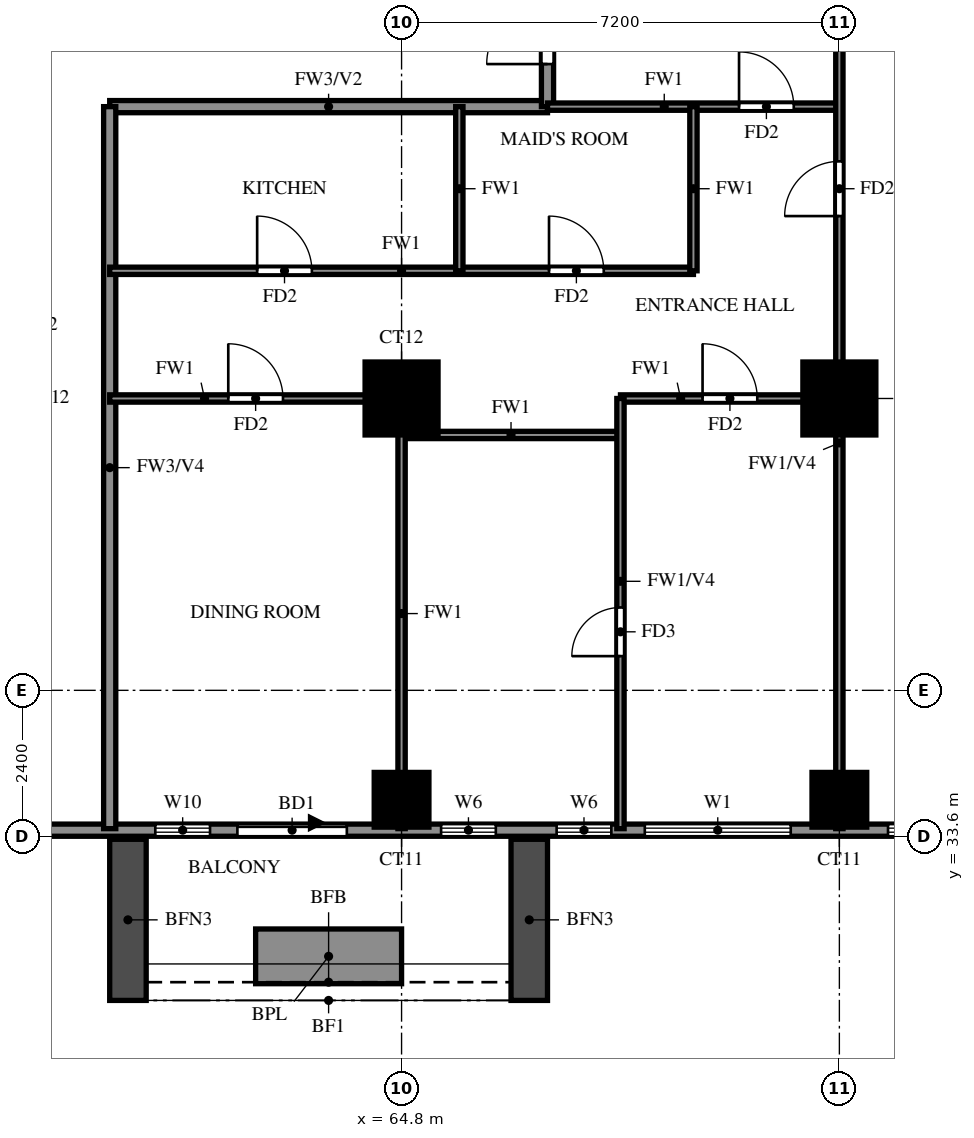
"""IFC4 building model, lengths in metres.
Left out: names, types, materials, properties, quantities, classifications, styles, units other than length and angle.
Written with IfcOpenShell. Run it as: python <this file> out.ifc"""

import sys

from ifc_helpers import new_model, si_unit, direction, frame, frame_2d, origin, origin_2d, place, context, subcontext, project, spatial, rectangle, extrude, source, transform, mapped, element, fill, save


model = new_model("IFC4")
c1 = context("Model", 3, precision=1e-05, world=origin(), true_north=direction((0.0, 1.0)))
c2 = subcontext(c1, "Body", "Model", "MODEL_VIEW")
j1 = project(units=[si_unit("LENGTHUNIT", "METRE"), si_unit("PLANEANGLEUNIT", "RADIAN")], contexts=[c1])
p1 = place(None, origin())
s1 = spatial("IfcSite", under=j1, at=p1, CompositionType="ELEMENT")
p2 = place(p1, origin())
s2 = spatial("IfcBuilding", under=s1, at=p2, CompositionType="ELEMENT")
p3 = place(p2, frame((0.0, 0.0, 100.5)))
s3 = spatial("IfcBuildingStorey", under=s2, at=p3, CompositionType="ELEMENT", Elevation=100.5)
m1 = source(origin(), c2, "Body", "SweptSolid", [
    extrude(rectangle(XDim=0.9, YDim=0.9, at=origin_2d()), origin(), (0.0, 0.0, 1.0), 3.18),
])
for number, where, z_axis, x_axis in (
    (1, (64.8, 34.2, 0.0), (0.0, 0.0, 1.0), (1.0, 0.0, 0.0)),
    (2, (72.0, 34.2, 0.0), (0.0, 0.0, 1.0), (1.0, 0.0, 0.0)),
):
    element("IfcColumn", number, at=place(p3, frame(where, z_axis=z_axis, x_axis=x_axis)), inside=s3, PredefinedType="COLUMN", context=c2, shape_type="MappedRepresentation", body=[
        mapped(m1, transform((0.0, 0.0, 0.0))),
    ])
m2 = source(origin(), c2, "Body", "SweptSolid", [
    extrude(rectangle(XDim=1.2, YDim=1.2, at=origin_2d()), origin(), (0.0, 0.0, 1.0), 3.18),
])
for number, where, z_axis, x_axis in (
    (3, (64.8, 40.8, 0.0), (0.0, 0.0, 1.0), (1.0, 0.0, 0.0)),
    (4, (72.0, 40.8, 0.0), (0.0, 0.0, 1.0), (1.0, 0.0, 0.0)),
):
    element("IfcColumn", number, at=place(p3, frame(where, z_axis=z_axis, x_axis=x_axis)), inside=s3, PredefinedType="COLUMN", context=c2, shape_type="MappedRepresentation", body=[
        mapped(m2, transform((0.0, 0.0, 0.0))),
    ])
p4 = place(p3, frame((85.996, 33.863, 0.0), z_axis=(0.0, 0.0, 1.0), x_axis=(-0.707100718496, 0.707112843825, 0.0)))
e5 = element("IfcWall", 5, at=p4, inside=s3, PredefinedType="SOLIDWALL", context=c2, shape_type="SweptSolid", body=[
    extrude(rectangle(XDim=20.135, YDim=0.2, at=frame_2d((10.067, 0.0))), origin(), (0.0, 0.0, 1.0), 3.18),
])
p5 = place(p3, frame((58.8, 33.7, 0.0), z_axis=(0.0, 0.0, 1.0), x_axis=(1.0, 0.0, 0.0)))
e6 = element("IfcWall", 6, at=p5, inside=s3, PredefinedType="SOLIDWALL", context=c2, shape_type="SweptSolid", body=[
    extrude(rectangle(XDim=27.359, YDim=0.2, at=frame_2d((13.679, 0.0))), origin(), (0.0, 0.0, 1.0), 3.18),
])
p6 = place(p5, frame((3.3, 0.0, 0.0)))
e7 = element("IfcOpeningElement", 7, at=p6, cuts=e6, PredefinedType="OPENING", context=c2, shape_type="SweptSolid", body=[
    extrude(rectangle(XDim=1.8, YDim=2.4, at=frame_2d((0.9, 1.2))), frame((0.0, 0.11, 0.0), z_axis=(0.0, -1.0, 0.0), x_axis=(1.0, 0.0, 0.0)), (0.0, 0.0, 1.0), 0.22),
])
p7 = place(p5, frame((18.3, 0.0, 0.0)))
e8 = element("IfcOpeningElement", 8, at=p7, cuts=e6, PredefinedType="OPENING", context=c2, shape_type="SweptSolid", body=[
    extrude(rectangle(XDim=1.8, YDim=2.4, at=frame_2d((0.9, 1.2))), frame((0.0, 0.11, 0.0), z_axis=(0.0, -1.0, 0.0), x_axis=(1.0, 0.0, 0.0)), (0.0, 0.0, 1.0), 0.22),
])
p8 = place(p5, frame((10.0, 0.0, 0.6)))
e9 = element("IfcOpeningElement", 9, at=p8, cuts=e6, PredefinedType="OPENING", context=c2, shape_type="SweptSolid", body=[
    extrude(rectangle(XDim=2.4, YDim=2.4, at=frame_2d((1.2, 1.2))), frame((0.0, 0.11, 0.0), z_axis=(0.0, -1.0, 0.0), x_axis=(1.0, 0.0, 0.0)), (0.0, 0.0, 1.0), 0.22),
])
p9 = place(p5, frame((6.65, 0.0, 1.5)))
e10 = element("IfcOpeningElement", 10, at=p9, cuts=e6, PredefinedType="OPENING", context=c2, shape_type="SweptSolid", body=[
    extrude(rectangle(XDim=0.9, YDim=0.9, at=frame_2d((0.45, 0.45))), frame((0.0, 0.11, 0.0), z_axis=(0.0, -1.0, 0.0), x_axis=(1.0, 0.0, 0.0)), (0.0, 0.0, 1.0), 0.22),
])
p10 = place(p5, frame((8.55, 0.0, 1.5)))
e11 = element("IfcOpeningElement", 11, at=p10, cuts=e6, PredefinedType="OPENING", context=c2, shape_type="SweptSolid", body=[
    extrude(rectangle(XDim=0.9, YDim=0.9, at=frame_2d((0.45, 0.45))), frame((0.0, 0.11, 0.0), z_axis=(0.0, -1.0, 0.0), x_axis=(1.0, 0.0, 0.0)), (0.0, 0.0, 1.0), 0.22),
])
p11 = place(p5, frame((1.95, 0.0, 0.6)))
e12 = element("IfcOpeningElement", 12, at=p11, cuts=e6, PredefinedType="OPENING", context=c2, shape_type="SweptSolid", body=[
    extrude(rectangle(XDim=0.9, YDim=2.4, at=frame_2d((0.45, 1.2))), frame((0.0, 0.11, 0.0), z_axis=(0.0, -1.0, 0.0), x_axis=(1.0, 0.0, 0.0)), (0.0, 0.0, 1.0), 0.22),
])
p12 = place(p5, frame((14.0, 0.0, 0.6)))
e13 = element("IfcOpeningElement", 13, at=p12, cuts=e6, PredefinedType="OPENING", context=c2, shape_type="SweptSolid", body=[
    extrude(rectangle(XDim=1.2, YDim=2.4, at=frame_2d((0.6, 1.2))), frame((0.0, 0.11, 0.0), z_axis=(0.0, -1.0, 0.0), x_axis=(1.0, 0.0, 0.0)), (0.0, 0.0, 1.0), 0.22),
])
p13 = place(p5, frame((16.5, 0.0, 0.6)))
e14 = element("IfcOpeningElement", 14, at=p13, cuts=e6, PredefinedType="OPENING", context=c2, shape_type="SweptSolid", body=[
    extrude(rectangle(XDim=1.2, YDim=2.4, at=frame_2d((0.6, 1.2))), frame((0.0, 0.11, 0.0), z_axis=(0.0, -1.0, 0.0), x_axis=(1.0, 0.0, 0.0)), (0.0, 0.0, 1.0), 0.22),
])
p14 = place(p5, frame((20.55, 0.0, 0.6)))
e15 = element("IfcOpeningElement", 15, at=p14, cuts=e6, PredefinedType="OPENING", context=c2, shape_type="SweptSolid", body=[
    extrude(rectangle(XDim=0.9, YDim=2.4, at=frame_2d((0.45, 1.2))), frame((0.0, 0.11, 0.0), z_axis=(0.0, -1.0, 0.0), x_axis=(1.0, 0.0, 0.0)), (0.0, 0.0, 1.0), 0.22),
])
p15 = place(p5, frame((23.779, 0.0, 0.6)))
e16 = element("IfcOpeningElement", 16, at=p15, cuts=e6, PredefinedType="OPENING", context=c2, shape_type="SweptSolid", body=[
    extrude(rectangle(XDim=2.4, YDim=2.4, at=frame_2d((1.2, 1.2))), frame((0.0, 0.11, 0.0), z_axis=(0.0, -1.0, 0.0), x_axis=(1.0, 0.0, 0.0)), (0.0, 0.0, 1.0), 0.22),
])
for number, where, z_axis, x_axis in (
    (17, (60.3, 33.55, 0.0), (0.0, 0.0, 1.0), (0.0, -1.0, 0.0)),
    (18, (66.9, 33.55, 0.0), (0.0, 0.0, 1.0), (0.0, -1.0, 0.0)),
):
    element("IfcWall", number, at=place(p3, frame(where, z_axis=z_axis, x_axis=x_axis)), inside=s3, PredefinedType="SOLIDWALL", context=c2, shape_type="SweptSolid", body=[
        extrude(rectangle(XDim=2.65, YDim=0.6, at=frame_2d((1.325, 0.0))), origin(), (0.0, 0.0, 1.0), 2.85),
    ])
p16 = place(p3, frame((62.4, 31.625, 0.0), z_axis=(0.0, 0.0, 1.0), x_axis=(1.0, 0.0, 0.0)))
e19 = element("IfcWall", 19, at=p16, inside=s3, PredefinedType="SOLIDWALL", context=c2, shape_type="SweptSolid", body=[
    extrude(rectangle(XDim=2.4, YDim=0.9, at=frame_2d((1.2, 0.0))), origin(), (0.0, 0.0, 1.0), 0.9),
])
p17 = place(p3, frame((60.0, 45.6, 0.0), z_axis=(0.0, 0.0, 1.0), x_axis=(1.0, 0.0, 0.0)))
e20 = element("IfcWall", 20, at=p17, inside=s3, PredefinedType="SOLIDWALL", context=c2, shape_type="SweptSolid", body=[
    extrude(rectangle(XDim=7.2, YDim=0.2, at=frame_2d((3.6, 0.0))), origin(), (0.0, 0.0, 1.0), 3.18),
])
p18 = place(p3, frame((60.0, 33.725, 0.0), z_axis=(0.0, 0.0, 1.0), x_axis=(0.0, 1.0, 0.0)))
e21 = element("IfcWall", 21, at=p18, inside=s3, PredefinedType="SOLIDWALL", context=c2, shape_type="SweptSolid", body=[
    extrude(rectangle(XDim=11.875, YDim=0.2, at=frame_2d((5.938, 0.0))), origin(), (0.0, 0.0, 1.0), 2.28),
])
p19 = place(p3, frame((67.2, 45.6, 0.0), z_axis=(0.0, 0.0, 1.0), x_axis=(0.0, 1.0, 0.0)))
e22 = element("IfcWall", 22, at=p19, inside=s3, PredefinedType="SOLIDWALL", context=c2, shape_type="SweptSolid", body=[
    extrude(rectangle(XDim=12.0, YDim=0.2, at=frame_2d((6.0, 0.0))), origin(), (0.0, 0.0, 1.0), 3.18),
])
p20 = place(p19, frame((10.3, 0.0, 0.0)))
e23 = element("IfcOpeningElement", 23, at=p20, cuts=e22, PredefinedType="OPENING", context=c2, shape_type="SweptSolid", body=[
    extrude(rectangle(XDim=1.0, YDim=2.1, at=frame_2d((0.5, 1.05))), frame((0.0, 0.11, 0.0), z_axis=(0.0, -1.0, 0.0), x_axis=(1.0, 0.0, 0.0)), (0.0, 0.0, 1.0), 0.22),
])
p21 = place(p19, frame((0.7, 0.0, 0.0)))
e24 = element("IfcOpeningElement", 24, at=p21, cuts=e22, PredefinedType="OPENING", context=c2, shape_type="SweptSolid", body=[
    extrude(rectangle(XDim=1.0, YDim=2.1, at=frame_2d((0.5, 1.05))), frame((0.0, 0.11, 0.0), z_axis=(0.0, -1.0, 0.0), x_axis=(1.0, 0.0, 0.0)), (0.0, 0.0, 1.0), 0.22),
])
p22 = place(p3, frame((64.8, 40.2, 0.0), z_axis=(0.0, 0.0, 1.0), x_axis=(1.0, 0.0, 0.0)))
e25 = element("IfcWall", 25, at=p22, inside=s3, PredefinedType="PARTITIONING", context=c2, shape_type="SweptSolid", body=[
    extrude(rectangle(XDim=3.6, YDim=0.12, at=frame_2d((1.8, 0.0))), origin(), (0.0, 0.0, 1.0), 3.18),
])
p23 = place(p3, frame((60.0, 40.8, 0.0), z_axis=(0.0, 0.0, 1.0), x_axis=(1.0, 0.0, 0.0)))
e26 = element("IfcWall", 26, at=p23, inside=s3, PredefinedType="PARTITIONING", context=c2, shape_type="SweptSolid", body=[
    extrude(rectangle(XDim=4.8, YDim=0.12, at=frame_2d((2.4, 0.0))), origin(), (0.0, 0.0, 1.0), 3.18),
])
p24 = place(p23, frame((1.95, 0.0, 0.0)))
e27 = element("IfcOpeningElement", 27, at=p24, cuts=e26, PredefinedType="OPENING", context=c2, shape_type="SweptSolid", body=[
    extrude(rectangle(XDim=0.9, YDim=2.1, at=frame_2d((0.45, 1.05))), frame((0.0, 0.07, 0.0), z_axis=(0.0, -1.0, 0.0), x_axis=(1.0, 0.0, 0.0)), (0.0, 0.0, 1.0), 0.14),
])
p25 = place(p3, frame((68.4, 40.8, 0.0), z_axis=(0.0, 0.0, 1.0), x_axis=(1.0, 0.0, 0.0)))
e28 = element("IfcWall", 28, at=p25, inside=s3, PredefinedType="PARTITIONING", context=c2, shape_type="SweptSolid", body=[
    extrude(rectangle(XDim=3.6, YDim=0.12, at=frame_2d((1.8, 0.0))), origin(), (0.0, 0.0, 1.0), 3.18),
])
p26 = place(p25, frame((1.35, 0.0, 0.0)))
e29 = element("IfcOpeningElement", 29, at=p26, cuts=e28, PredefinedType="OPENING", context=c2, shape_type="SweptSolid", body=[
    extrude(rectangle(XDim=0.9, YDim=2.1, at=frame_2d((0.45, 1.05))), frame((0.0, 0.07, 0.0), z_axis=(0.0, -1.0, 0.0), x_axis=(1.0, 0.0, 0.0)), (0.0, 0.0, 1.0), 0.14),
])
p27 = place(p3, frame((60.0, 42.9, 0.0), z_axis=(0.0, 0.0, 1.0), x_axis=(1.0, 0.0, 0.0)))
e30 = element("IfcWall", 30, at=p27, inside=s3, PredefinedType="PARTITIONING", context=c2, shape_type="SweptSolid", body=[
    extrude(rectangle(XDim=9.6, YDim=0.12, at=frame_2d((4.8, 0.0))), origin(), (0.0, 0.0, 1.0), 3.18),
])
p28 = place(p27, frame((7.225, 0.0, 0.0)))
e31 = element("IfcOpeningElement", 31, at=p28, cuts=e30, PredefinedType="OPENING", context=c2, shape_type="SweptSolid", body=[
    extrude(rectangle(XDim=0.9, YDim=2.1, at=frame_2d((0.45, 1.05))), frame((0.0, 0.07, 0.0), z_axis=(0.0, -1.0, 0.0), x_axis=(1.0, 0.0, 0.0)), (0.0, 0.0, 1.0), 0.14),
])
p29 = place(p27, frame((2.425, 0.0, 0.0)))
e32 = element("IfcOpeningElement", 32, at=p29, cuts=e30, PredefinedType="OPENING", context=c2, shape_type="SweptSolid", body=[
    extrude(rectangle(XDim=0.9, YDim=2.1, at=frame_2d((0.45, 1.05))), frame((0.0, 0.07, 0.0), z_axis=(0.0, -1.0, 0.0), x_axis=(1.0, 0.0, 0.0)), (0.0, 0.0, 1.0), 0.14),
])
p30 = place(p3, frame((67.2, 45.6, 0.0), z_axis=(0.0, 0.0, 1.0), x_axis=(1.0, 0.0, 0.0)))
e33 = element("IfcWall", 33, at=p30, inside=s3, PredefinedType="PARTITIONING", context=c2, shape_type="SweptSolid", body=[
    extrude(rectangle(XDim=4.8, YDim=0.12, at=frame_2d((2.4, 0.0))), origin(), (0.0, 0.0, 1.0), 3.18),
])
p31 = place(p30, frame((3.15, 0.0, 0.0)))
e34 = element("IfcOpeningElement", 34, at=p31, cuts=e33, PredefinedType="OPENING", context=c2, shape_type="SweptSolid", body=[
    extrude(rectangle(XDim=0.9, YDim=2.1, at=frame_2d((0.45, 1.05))), frame((0.0, 0.07, 0.0), z_axis=(0.0, -1.0, 0.0), x_axis=(1.0, 0.0, 0.0)), (0.0, 0.0, 1.0), 0.14),
])
p32 = place(p3, frame((64.8, 33.725, 0.0), z_axis=(0.0, 0.0, 1.0), x_axis=(0.0, 1.0, 0.0)))
e35 = element("IfcWall", 35, at=p32, inside=s3, PredefinedType="PARTITIONING", context=c2, shape_type="SweptSolid", body=[
    extrude(rectangle(XDim=7.075, YDim=0.12, at=frame_2d((3.538, 0.0))), origin(), (0.0, 0.0, 1.0), 3.18),
])
p33 = place(p3, frame((65.75, 42.9, 0.0), z_axis=(0.0, 0.0, 1.0), x_axis=(0.0, 1.0, 0.0)))
e36 = element("IfcWall", 36, at=p33, inside=s3, PredefinedType="PARTITIONING", context=c2, shape_type="SweptSolid", body=[
    extrude(rectangle(XDim=2.7, YDim=0.12, at=frame_2d((1.35, 0.0))), origin(), (0.0, 0.0, 1.0), 3.18),
])
p34 = place(p3, frame((68.4, 33.725, 0.0), z_axis=(0.0, 0.0, 1.0), x_axis=(0.0, 1.0, 0.0)))
e37 = element("IfcWall", 37, at=p34, inside=s3, PredefinedType="PARTITIONING", context=c2, shape_type="SweptSolid", body=[
    extrude(rectangle(XDim=7.075, YDim=0.12, at=frame_2d((3.538, 0.0))), origin(), (0.0, 0.0, 1.0), 2.28),
])
p35 = place(p34, frame((2.837, 0.0, 0.0)))
e38 = element("IfcOpeningElement", 38, at=p35, cuts=e37, PredefinedType="OPENING", context=c2, shape_type="SweptSolid", body=[
    extrude(rectangle(XDim=0.8, YDim=2.1, at=frame_2d((0.4, 1.05))), frame((0.0, 0.07, 0.0), z_axis=(0.0, -1.0, 0.0), x_axis=(1.0, 0.0, 0.0)), (0.0, 0.0, 1.0), 0.14),
])
p36 = place(p3, frame((69.6, 42.9, 0.0), z_axis=(0.0, 0.0, 1.0), x_axis=(0.0, 1.0, 0.0)))
e39 = element("IfcWall", 39, at=p36, inside=s3, PredefinedType="PARTITIONING", context=c2, shape_type="SweptSolid", body=[
    extrude(rectangle(XDim=2.7, YDim=0.12, at=frame_2d((1.35, 0.0))), origin(), (0.0, 0.0, 1.0), 3.18),
])
p37 = place(p3, frame((72.0, 33.725, 0.0), z_axis=(0.0, 0.0, 1.0), x_axis=(0.0, 1.0, 0.0)))
e40 = element("IfcWall", 40, at=p37, inside=s3, PredefinedType="PARTITIONING", context=c2, shape_type="SweptSolid", body=[
    extrude(rectangle(XDim=14.098, YDim=0.12, at=frame_2d((7.049, 0.0))), origin(), (0.0, 0.0, 1.0), 2.28),
])
p38 = place(p37, frame((10.075, 0.0, 0.0)))
e41 = element("IfcOpeningElement", 41, at=p38, cuts=e40, PredefinedType="OPENING", context=c2, shape_type="SweptSolid", body=[
    extrude(rectangle(XDim=0.9, YDim=2.1, at=frame_2d((0.45, 1.05))), frame((0.0, 0.07, 0.0), z_axis=(0.0, -1.0, 0.0), x_axis=(1.0, 0.0, 0.0)), (0.0, 0.0, 1.0), 0.14),
])
p39 = place(p6, origin())
e42 = element("IfcDoor", 42, at=p39, inside=s3, OperationType="DOUBLE_DOOR_SLIDING", PredefinedType="DOOR", context=c2, shape_type="SweptSolid", body=[
    extrude(rectangle(XDim=1.8, YDim=2.4, at=frame_2d((0.9, 1.2))), frame((0.0, 0.025, 0.0), z_axis=(0.0, -1.0, 0.0), x_axis=(1.0, 0.0, 0.0)), (0.0, 0.0, 1.0), 0.05),
])
fill(e7, e42)
p40 = place(p8, origin())
e43 = element("IfcWindow", 43, at=p40, inside=s3, PartitioningType="DOUBLE_PANEL_VERTICAL", PredefinedType="WINDOW", context=c2, shape_type="SweptSolid", body=[
    extrude(rectangle(XDim=2.4, YDim=2.4, at=frame_2d((1.2, 1.2))), frame((0.0, 0.03, 0.0), z_axis=(0.0, -1.0, 0.0), x_axis=(1.0, 0.0, 0.0)), (0.0, 0.0, 1.0), 0.06),
])
fill(e9, e43)
p41 = place(p9, origin())
e44 = element("IfcWindow", 44, at=p41, inside=s3, PartitioningType="SINGLE_PANEL", PredefinedType="WINDOW", context=c2, shape_type="SweptSolid", body=[
    extrude(rectangle(XDim=0.9, YDim=0.9, at=frame_2d((0.45, 0.45))), frame((0.0, 0.03, 0.0), z_axis=(0.0, -1.0, 0.0), x_axis=(1.0, 0.0, 0.0)), (0.0, 0.0, 1.0), 0.06),
])
fill(e10, e44)
p42 = place(p10, origin())
e45 = element("IfcWindow", 45, at=p42, inside=s3, PartitioningType="SINGLE_PANEL", PredefinedType="WINDOW", context=c2, shape_type="SweptSolid", body=[
    extrude(rectangle(XDim=0.9, YDim=0.9, at=frame_2d((0.45, 0.45))), frame((0.0, 0.03, 0.0), z_axis=(0.0, -1.0, 0.0), x_axis=(1.0, 0.0, 0.0)), (0.0, 0.0, 1.0), 0.06),
])
fill(e11, e45)
p43 = place(p11, origin())
e46 = element("IfcWindow", 46, at=p43, inside=s3, PartitioningType="SINGLE_PANEL", PredefinedType="WINDOW", context=c2, shape_type="SweptSolid", body=[
    extrude(rectangle(XDim=0.9, YDim=2.4, at=frame_2d((0.45, 1.2))), frame((0.0, 0.03, 0.0), z_axis=(0.0, -1.0, 0.0), x_axis=(1.0, 0.0, 0.0)), (0.0, 0.0, 1.0), 0.06),
])
fill(e12, e46)
p44 = place(p12, origin())
e47 = element("IfcWindow", 47, at=p44, inside=s3, PartitioningType="SINGLE_PANEL", PredefinedType="WINDOW", context=c2, shape_type="SweptSolid", body=[
    extrude(rectangle(XDim=1.2, YDim=2.4, at=frame_2d((0.6, 1.2))), frame((0.0, 0.03, 0.0), z_axis=(0.0, -1.0, 0.0), x_axis=(1.0, 0.0, 0.0)), (0.0, 0.0, 1.0), 0.06),
])
fill(e13, e47)
p45 = place(p31, origin())
e48 = element("IfcDoor", 48, at=p45, inside=s3, OperationType="SINGLE_SWING_LEFT", PredefinedType="DOOR", context=c2, shape_type="SweptSolid", body=[
    extrude(rectangle(XDim=0.9, YDim=2.1, at=frame_2d((0.45, 1.05))), frame((0.0, 0.025, 0.0), z_axis=(0.0, -1.0, 0.0), x_axis=(1.0, 0.0, 0.0)), (0.0, 0.0, 1.0), 0.05),
])
fill(e34, e48)
p46 = place(p21, origin())
e49 = element("IfcDoor", 49, at=p46, inside=s3, OperationType="SINGLE_SWING_LEFT", PredefinedType="DOOR", context=c2, shape_type="SweptSolid", body=[
    extrude(rectangle(XDim=1.0, YDim=2.1, at=frame_2d((0.5, 1.05))), frame((0.0, 0.025, 0.0), z_axis=(0.0, -1.0, 0.0), x_axis=(1.0, 0.0, 0.0)), (0.0, 0.0, 1.0), 0.05),
])
fill(e24, e49)
p47 = place(p26, origin())
e50 = element("IfcDoor", 50, at=p47, inside=s3, OperationType="SINGLE_SWING_RIGHT", PredefinedType="DOOR", context=c2, shape_type="SweptSolid", body=[
    extrude(rectangle(XDim=0.9, YDim=2.1, at=frame_2d((0.45, 1.05))), frame((0.0, 0.025, 0.0), z_axis=(0.0, -1.0, 0.0), x_axis=(1.0, 0.0, 0.0)), (0.0, 0.0, 1.0), 0.05),
])
fill(e29, e50)
p48 = place(p35, origin())
e51 = element("IfcDoor", 51, at=p48, inside=s3, OperationType="SINGLE_SWING_LEFT", PredefinedType="DOOR", context=c2, shape_type="SweptSolid", body=[
    extrude(rectangle(XDim=0.8, YDim=2.1, at=frame_2d((0.4, 1.05))), frame((0.0, 0.025, 0.0), z_axis=(0.0, -1.0, 0.0), x_axis=(1.0, 0.0, 0.0)), (0.0, 0.0, 1.0), 0.05),
])
fill(e38, e51)
p49 = place(p24, origin())
e52 = element("IfcDoor", 52, at=p49, inside=s3, OperationType="SINGLE_SWING_LEFT", PredefinedType="DOOR", context=c2, shape_type="SweptSolid", body=[
    extrude(rectangle(XDim=0.9, YDim=2.1, at=frame_2d((0.45, 1.05))), frame((0.0, 0.025, 0.0), z_axis=(0.0, -1.0, 0.0), x_axis=(1.0, 0.0, 0.0)), (0.0, 0.0, 1.0), 0.05),
])
fill(e27, e52)
p50 = place(p28, origin())
e53 = element("IfcDoor", 53, at=p50, inside=s3, OperationType="SINGLE_SWING_RIGHT", PredefinedType="DOOR", context=c2, shape_type="SweptSolid", body=[
    extrude(rectangle(XDim=0.9, YDim=2.1, at=frame_2d((0.45, 1.05))), frame((0.0, 0.025, 0.0), z_axis=(0.0, -1.0, 0.0), x_axis=(1.0, 0.0, 0.0)), (0.0, 0.0, 1.0), 0.05),
])
fill(e31, e53)
p51 = place(p29, origin())
e54 = element("IfcDoor", 54, at=p51, inside=s3, OperationType="SINGLE_SWING_LEFT", PredefinedType="DOOR", context=c2, shape_type="SweptSolid", body=[
    extrude(rectangle(XDim=0.9, YDim=2.1, at=frame_2d((0.45, 1.05))), frame((0.0, 0.025, 0.0), z_axis=(0.0, -1.0, 0.0), x_axis=(1.0, 0.0, 0.0)), (0.0, 0.0, 1.0), 0.05),
])
fill(e32, e54)
p52 = place(p38, origin())
e55 = element("IfcDoor", 55, at=p52, inside=s3, OperationType="SINGLE_SWING_LEFT", PredefinedType="DOOR", context=c2, shape_type="SweptSolid", body=[
    extrude(rectangle(XDim=0.9, YDim=2.1, at=frame_2d((0.45, 1.05))), frame((0.0, 0.025, 0.0), z_axis=(0.0, -1.0, 0.0), x_axis=(1.0, 0.0, 0.0)), (0.0, 0.0, 1.0), 0.05),
])
fill(e41, e55)
save(model, sys.argv[1])
